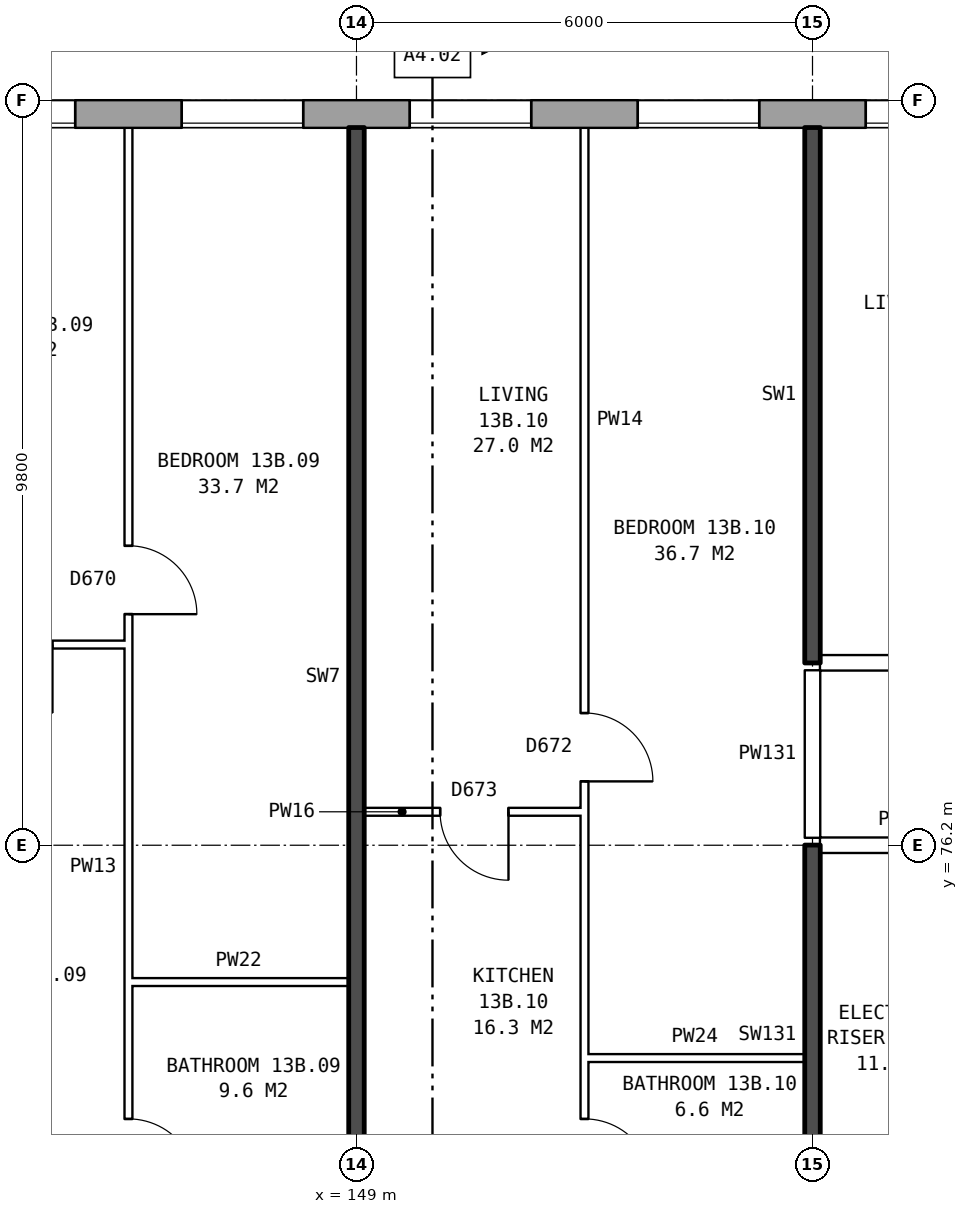
"""IFC4 building model, lengths in metres.
Left out: names, types, materials, properties, quantities, classifications, styles, units other than length and angle.
Written with IfcOpenShell. Run it as: python <this file> out.ifc"""

import sys

from ifc_helpers import new_model, si_unit, direction, frame, frame_2d, origin, place, context, subcontext, project, spatial, rectangle, extrude, element, fill, save


model = new_model("IFC4")
c1 = context("Model", 3, precision=1e-05, world=origin(), true_north=direction((0.0, 1.0)))
c2 = subcontext(c1, "Body", "Model", "MODEL_VIEW")
j1 = project(units=[si_unit("LENGTHUNIT", "METRE"), si_unit("PLANEANGLEUNIT", "RADIAN")], contexts=[c1])
p1 = place(None, origin())
s1 = spatial("IfcSite", under=j1, at=p1, CompositionType="ELEMENT")
p2 = place(p1, origin())
s2 = spatial("IfcBuilding", under=s1, at=p2, CompositionType="ELEMENT")
p3 = place(p2, frame((0.0, 0.0, 50.5)))
s3 = spatial("IfcBuildingStorey", under=s2, at=p3, CompositionType="ELEMENT", Elevation=50.5)
p4 = place(p3, frame((173.425, 85.82, 0.0), z_axis=(0.0, 0.0, 1.0), x_axis=(-1.0, 0.0, 0.0)))
e1 = element("IfcWall", 1, at=p4, inside=s3, PredefinedType="STANDARD", context=c2, shape_type="SweptSolid", body=[
    extrude(rectangle(XDim=39.351, YDim=0.36, at=frame_2d((19.675, 0.0))), origin(), (0.0, 0.0, 1.0), 2.85),
])
p5 = place(p4, frame((1.125, 0.0, 0.8)))
e2 = element("IfcOpeningElement", 2, at=p5, cuts=e1, PredefinedType="OPENING", context=c2, shape_type="SweptSolid", body=[
    extrude(rectangle(XDim=1.6, YDim=1.8, at=frame_2d((0.8, 0.9))), frame((0.0, 0.19, 0.0), z_axis=(0.0, -1.0, 0.0), x_axis=(1.0, 0.0, 0.0)), (0.0, 0.0, 1.0), 0.38),
])
p6 = place(p4, frame((4.125, 0.0, 0.8)))
e3 = element("IfcOpeningElement", 3, at=p6, cuts=e1, PredefinedType="OPENING", context=c2, shape_type="SweptSolid", body=[
    extrude(rectangle(XDim=1.6, YDim=1.8, at=frame_2d((0.8, 0.9))), frame((0.0, 0.19, 0.0), z_axis=(0.0, -1.0, 0.0), x_axis=(1.0, 0.0, 0.0)), (0.0, 0.0, 1.0), 0.38),
])
p7 = place(p4, frame((7.725, 0.0, 0.8)))
e4 = element("IfcOpeningElement", 4, at=p7, cuts=e1, PredefinedType="OPENING", context=c2, shape_type="SweptSolid", body=[
    extrude(rectangle(XDim=0.6, YDim=0.9, at=frame_2d((0.3, 0.45))), frame((0.0, 0.19, 0.0), z_axis=(0.0, -1.0, 0.0), x_axis=(1.0, 0.0, 0.0)), (0.0, 0.0, 1.0), 0.38),
])
p8 = place(p4, frame((10.125, 0.0, 0.8)))
e5 = element("IfcOpeningElement", 5, at=p8, cuts=e1, PredefinedType="OPENING", context=c2, shape_type="SweptSolid", body=[
    extrude(rectangle(XDim=1.6, YDim=1.8, at=frame_2d((0.8, 0.9))), frame((0.0, 0.19, 0.0), z_axis=(0.0, -1.0, 0.0), x_axis=(1.0, 0.0, 0.0)), (0.0, 0.0, 1.0), 0.38),
])
p9 = place(p4, frame((13.125, 0.0, 0.8)))
e6 = element("IfcOpeningElement", 6, at=p9, cuts=e1, PredefinedType="OPENING", context=c2, shape_type="SweptSolid", body=[
    extrude(rectangle(XDim=1.6, YDim=1.8, at=frame_2d((0.8, 0.9))), frame((0.0, 0.19, 0.0), z_axis=(0.0, -1.0, 0.0), x_axis=(1.0, 0.0, 0.0)), (0.0, 0.0, 1.0), 0.38),
])
p10 = place(p4, frame((16.125, 0.0, 0.8)))
e7 = element("IfcOpeningElement", 7, at=p10, cuts=e1, PredefinedType="OPENING", context=c2, shape_type="SweptSolid", body=[
    extrude(rectangle(XDim=1.6, YDim=1.8, at=frame_2d((0.8, 0.9))), frame((0.0, 0.19, 0.0), z_axis=(0.0, -1.0, 0.0), x_axis=(1.0, 0.0, 0.0)), (0.0, 0.0, 1.0), 0.38),
])
p11 = place(p4, frame((19.125, 0.0, 0.8)))
e8 = element("IfcOpeningElement", 8, at=p11, cuts=e1, PredefinedType="OPENING", context=c2, shape_type="SweptSolid", body=[
    extrude(rectangle(XDim=1.6, YDim=1.8, at=frame_2d((0.8, 0.9))), frame((0.0, 0.19, 0.0), z_axis=(0.0, -1.0, 0.0), x_axis=(1.0, 0.0, 0.0)), (0.0, 0.0, 1.0), 0.38),
])
p12 = place(p4, frame((22.125, 0.0, 0.8)))
e9 = element("IfcOpeningElement", 9, at=p12, cuts=e1, PredefinedType="OPENING", context=c2, shape_type="SweptSolid", body=[
    extrude(rectangle(XDim=1.6, YDim=1.8, at=frame_2d((0.8, 0.9))), frame((0.0, 0.19, 0.0), z_axis=(0.0, -1.0, 0.0), x_axis=(1.0, 0.0, 0.0)), (0.0, 0.0, 1.0), 0.38),
])
p13 = place(p4, frame((25.125, 0.0, 0.8)))
e10 = element("IfcOpeningElement", 10, at=p13, cuts=e1, PredefinedType="OPENING", context=c2, shape_type="SweptSolid", body=[
    extrude(rectangle(XDim=1.6, YDim=1.8, at=frame_2d((0.8, 0.9))), frame((0.0, 0.19, 0.0), z_axis=(0.0, -1.0, 0.0), x_axis=(1.0, 0.0, 0.0)), (0.0, 0.0, 1.0), 0.38),
])
p14 = place(p4, frame((28.125, 0.0, 0.8)))
e11 = element("IfcOpeningElement", 11, at=p14, cuts=e1, PredefinedType="OPENING", context=c2, shape_type="SweptSolid", body=[
    extrude(rectangle(XDim=1.6, YDim=1.8, at=frame_2d((0.8, 0.9))), frame((0.0, 0.19, 0.0), z_axis=(0.0, -1.0, 0.0), x_axis=(1.0, 0.0, 0.0)), (0.0, 0.0, 1.0), 0.38),
])
p15 = place(p4, frame((30.625, 0.0, 0.8)))
e12 = element("IfcOpeningElement", 12, at=p15, cuts=e1, PredefinedType="OPENING", context=c2, shape_type="SweptSolid", body=[
    extrude(rectangle(XDim=1.0, YDim=0.9, at=frame_2d((0.5, 0.45))), frame((0.0, 0.19, 0.0), z_axis=(0.0, -1.0, 0.0), x_axis=(1.0, 0.0, 0.0)), (0.0, 0.0, 1.0), 0.38),
])
p16 = place(p4, frame((34.125, 0.0, 0.8)))
e13 = element("IfcOpeningElement", 13, at=p16, cuts=e1, PredefinedType="OPENING", context=c2, shape_type="SweptSolid", body=[
    extrude(rectangle(XDim=1.6, YDim=1.8, at=frame_2d((0.8, 0.9))), frame((0.0, 0.19, 0.0), z_axis=(0.0, -1.0, 0.0), x_axis=(1.0, 0.0, 0.0)), (0.0, 0.0, 1.0), 0.38),
])
p17 = place(p4, frame((37.125, 0.0, 0.8)))
e14 = element("IfcOpeningElement", 14, at=p17, cuts=e1, PredefinedType="OPENING", context=c2, shape_type="SweptSolid", body=[
    extrude(rectangle(XDim=1.6, YDim=1.8, at=frame_2d((0.8, 0.9))), frame((0.0, 0.19, 0.0), z_axis=(0.0, -1.0, 0.0), x_axis=(1.0, 0.0, 0.0)), (0.0, 0.0, 1.0), 0.38),
])
p18 = place(p4, frame((8.625, 0.0, 0.8)))
e15 = element("IfcOpeningElement", 15, at=p18, cuts=e1, PredefinedType="OPENING", context=c2, shape_type="SweptSolid", body=[
    extrude(rectangle(XDim=0.6, YDim=1.5, at=frame_2d((0.3, 0.75))), frame((0.0, 0.19, 0.0), z_axis=(0.0, -1.0, 0.0), x_axis=(1.0, 0.0, 0.0)), (0.0, 0.0, 1.0), 0.38),
])
p19 = place(p4, frame((32.875, 0.0, 1.7)))
e16 = element("IfcOpeningElement", 16, at=p19, cuts=e1, PredefinedType="OPENING", context=c2, shape_type="SweptSolid", body=[
    extrude(rectangle(XDim=0.8, YDim=0.9, at=frame_2d((0.4, 0.45))), frame((0.0, 0.19, 0.0), z_axis=(0.0, -1.0, 0.0), x_axis=(1.0, 0.0, 0.0)), (0.0, 0.0, 1.0), 0.38),
])
for number, where, z_axis, x_axis in (
    (17, (152.0, 73.4, 0.0), (0.0, 0.0, 1.0), (1.0, 0.0, 0.0)),
    (18, (146.0, 74.4, 0.0), (0.0, 0.0, 1.0), (1.0, 0.0, 0.0)),
):
    element("IfcWall", number, at=place(p3, frame(where, z_axis=z_axis, x_axis=x_axis)), inside=s3, PredefinedType="PARTITIONING", context=c2, shape_type="SweptSolid", body=[
        extrude(rectangle(XDim=2.9, YDim=0.1, at=frame_2d((1.45, 0.0))), origin(), (0.0, 0.0, 1.0), 2.85),
    ])
p20 = place(p3, frame((155.1, 76.2, 0.0), z_axis=(0.0, 0.0, 1.0), x_axis=(1.0, 0.0, 0.0)))
e19 = element("IfcWall", 19, at=p20, inside=s3, PredefinedType="PARTITIONING", context=c2, shape_type="SweptSolid", body=[
    extrude(rectangle(XDim=2.14, YDim=0.2, at=frame_2d((1.07, 0.0))), origin(), (0.0, 0.0, 1.0), 2.85),
])
p21 = place(p3, frame((149.1, 76.64, 0.0), z_axis=(0.0, 0.0, 1.0), x_axis=(1.0, 0.0, 0.0)))
e20 = element("IfcWall", 20, at=p21, inside=s3, PredefinedType="PARTITIONING", context=c2, shape_type="SweptSolid", body=[
    extrude(rectangle(XDim=2.9, YDim=0.1, at=frame_2d((1.45, 0.0))), origin(), (0.0, 0.0, 1.0), 2.85),
])
p22 = place(p21, frame((1.0, 0.0, 0.0)))
e21 = element("IfcOpeningElement", 21, at=p22, cuts=e20, PredefinedType="OPENING", context=c2, shape_type="SweptSolid", body=[
    extrude(rectangle(XDim=0.9, YDim=2.1, at=frame_2d((0.45, 1.05))), frame((0.0, 0.06, 0.0), z_axis=(0.0, -1.0, 0.0), x_axis=(1.0, 0.0, 0.0)), (0.0, 0.0, 1.0), 0.12),
])
p23 = place(p3, frame((155.1, 78.6, 0.0), z_axis=(0.0, 0.0, 1.0), x_axis=(1.0, 0.0, 0.0)))
e22 = element("IfcWall", 22, at=p23, inside=s3, PredefinedType="PARTITIONING", context=c2, shape_type="SweptSolid", body=[
    extrude(rectangle(XDim=21.04, YDim=0.2, at=frame_2d((10.52, 0.0))), origin(), (0.0, 0.0, 1.0), 2.85),
])
p24 = place(p23, frame((2.45, 0.0, 0.0)))
e23 = element("IfcOpeningElement", 23, at=p24, cuts=e22, PredefinedType="OPENING", context=c2, shape_type="SweptSolid", body=[
    extrude(rectangle(XDim=1.0, YDim=2.1, at=frame_2d((0.5, 1.05))), frame((0.0, 0.11, 0.0), z_axis=(0.0, -1.0, 0.0), x_axis=(1.0, 0.0, 0.0)), (0.0, 0.0, 1.0), 0.22),
])
p25 = place(p23, frame((14.4, 0.0, 0.0)))
e24 = element("IfcOpeningElement", 24, at=p25, cuts=e22, PredefinedType="OPENING", context=c2, shape_type="SweptSolid", body=[
    extrude(rectangle(XDim=1.0, YDim=2.1, at=frame_2d((0.5, 1.05))), frame((0.0, 0.11, 0.0), z_axis=(0.0, -1.0, 0.0), x_axis=(1.0, 0.0, 0.0)), (0.0, 0.0, 1.0), 0.22),
])
p26 = place(p3, frame((143.1, 78.84, 0.0), z_axis=(0.0, 0.0, 1.0), x_axis=(1.0, 0.0, 0.0)))
e25 = element("IfcWall", 25, at=p26, inside=s3, PredefinedType="PARTITIONING", context=c2, shape_type="SweptSolid", body=[
    extrude(rectangle(XDim=2.9, YDim=0.1, at=frame_2d((1.45, 0.0))), origin(), (0.0, 0.0, 1.0), 2.85),
])
p27 = place(p26, frame((1.0, 0.0, 0.0)))
e26 = element("IfcOpeningElement", 26, at=p27, cuts=e25, PredefinedType="OPENING", context=c2, shape_type="SweptSolid", body=[
    extrude(rectangle(XDim=0.9, YDim=2.1, at=frame_2d((0.45, 1.05))), frame((0.0, 0.06, 0.0), z_axis=(0.0, -1.0, 0.0), x_axis=(1.0, 0.0, 0.0)), (0.0, 0.0, 1.0), 0.12),
])
p28 = place(p3, frame((146.0, 71.3, 0.0), z_axis=(0.0, 0.0, 1.0), x_axis=(0.0, 1.0, 0.0)))
e27 = element("IfcWall", 27, at=p28, inside=s3, PredefinedType="PARTITIONING", context=c2, shape_type="SweptSolid", body=[
    extrude(rectangle(XDim=14.34, YDim=0.1, at=frame_2d((7.17, 0.0))), origin(), (0.0, 0.0, 1.0), 2.85),
])
p29 = place(p28, frame((7.94, 0.0, 0.0)))
e28 = element("IfcOpeningElement", 28, at=p29, cuts=e27, PredefinedType="OPENING", context=c2, shape_type="SweptSolid", body=[
    extrude(rectangle(XDim=0.9, YDim=2.1, at=frame_2d((0.45, 1.05))), frame((0.0, 0.06, 0.0), z_axis=(0.0, -1.0, 0.0), x_axis=(1.0, 0.0, 0.0)), (0.0, 0.0, 1.0), 0.12),
])
p30 = place(p28, frame((0.4, 0.0, 0.0)))
e29 = element("IfcOpeningElement", 29, at=p30, cuts=e27, PredefinedType="OPENING", context=c2, shape_type="SweptSolid", body=[
    extrude(rectangle(XDim=0.9, YDim=2.1, at=frame_2d((0.45, 1.05))), frame((0.0, 0.06, 0.0), z_axis=(0.0, -1.0, 0.0), x_axis=(1.0, 0.0, 0.0)), (0.0, 0.0, 1.0), 0.12),
])
p31 = place(p3, frame((149.0, 71.2, 0.0), z_axis=(0.0, 0.0, 1.0), x_axis=(0.0, 1.0, 0.0)))
e30 = element("IfcWall", 30, at=p31, inside=s3, PredefinedType="SOLIDWALL", context=c2, shape_type="SweptSolid", body=[
    extrude(rectangle(XDim=14.44, YDim=0.2, at=frame_2d((7.22, 0.0))), origin(), (0.0, 0.0, 1.0), 2.85),
])
p32 = place(p3, frame((152.0, 71.3, 0.0), z_axis=(0.0, 0.0, 1.0), x_axis=(0.0, 1.0, 0.0)))
e31 = element("IfcWall", 31, at=p32, inside=s3, PredefinedType="PARTITIONING", context=c2, shape_type="SweptSolid", body=[
    extrude(rectangle(XDim=14.34, YDim=0.1, at=frame_2d((7.17, 0.0))), origin(), (0.0, 0.0, 1.0), 2.85),
])
p33 = place(p32, frame((5.74, 0.0, 0.0)))
e32 = element("IfcOpeningElement", 32, at=p33, cuts=e31, PredefinedType="OPENING", context=c2, shape_type="SweptSolid", body=[
    extrude(rectangle(XDim=0.9, YDim=2.1, at=frame_2d((0.45, 1.05))), frame((0.0, 0.06, 0.0), z_axis=(0.0, -1.0, 0.0), x_axis=(1.0, 0.0, 0.0)), (0.0, 0.0, 1.0), 0.12),
])
p34 = place(p32, frame((0.4, 0.0, 0.0)))
e33 = element("IfcOpeningElement", 33, at=p34, cuts=e31, PredefinedType="OPENING", context=c2, shape_type="SweptSolid", body=[
    extrude(rectangle(XDim=0.9, YDim=2.1, at=frame_2d((0.45, 1.05))), frame((0.0, 0.06, 0.0), z_axis=(0.0, -1.0, 0.0), x_axis=(1.0, 0.0, 0.0)), (0.0, 0.0, 1.0), 0.12),
])
p35 = place(p3, frame((155.0, 71.2, 0.0), z_axis=(0.0, 0.0, 1.0), x_axis=(0.0, 1.0, 0.0)))
e34 = element("IfcWall", 34, at=p35, inside=s3, PredefinedType="SOLIDWALL", context=c2, shape_type="SweptSolid", body=[
    extrude(rectangle(XDim=5.0, YDim=0.2, at=frame_2d((2.5, 0.0))), origin(), (0.0, 0.0, 1.0), 2.85),
])
p36 = place(p3, frame((155.0, 76.3, 0.0), z_axis=(0.0, 0.0, 1.0), x_axis=(0.0, 1.0, 0.0)))
e35 = element("IfcWall", 35, at=p36, inside=s3, PredefinedType="PARTITIONING", context=c2, shape_type="SweptSolid", body=[
    extrude(rectangle(XDim=2.2, YDim=0.2, at=frame_2d((1.1, 0.0))), origin(), (0.0, 0.0, 1.0), 2.85),
])
p37 = place(p3, frame((155.0, 78.6, 0.0), z_axis=(0.0, 0.0, 1.0), x_axis=(0.0, 1.0, 0.0)))
e36 = element("IfcWall", 36, at=p37, inside=s3, PredefinedType="SOLIDWALL", context=c2, shape_type="SweptSolid", body=[
    extrude(rectangle(XDim=7.04, YDim=0.2, at=frame_2d((3.52, 0.0))), origin(), (0.0, 0.0, 1.0), 2.85),
])
p38 = place(p10, origin())
e37 = element("IfcWindow", 37, at=p38, inside=s3, PartitioningType="SINGLE_PANEL", PredefinedType="WINDOW", context=c2, shape_type="SweptSolid", body=[
    extrude(rectangle(XDim=1.6, YDim=1.8, at=frame_2d((0.8, 0.9))), frame((0.0, 0.15, 0.0), z_axis=(0.0, -1.0, 0.0), x_axis=(1.0, 0.0, 0.0)), (0.0, 0.0, 1.0), 0.06),
])
fill(e7, e37)
p39 = place(p11, origin())
e38 = element("IfcWindow", 38, at=p39, inside=s3, PartitioningType="SINGLE_PANEL", PredefinedType="WINDOW", context=c2, shape_type="SweptSolid", body=[
    extrude(rectangle(XDim=1.6, YDim=1.8, at=frame_2d((0.8, 0.9))), frame((0.0, 0.15, 0.0), z_axis=(0.0, -1.0, 0.0), x_axis=(1.0, 0.0, 0.0)), (0.0, 0.0, 1.0), 0.06),
])
fill(e8, e38)
p40 = place(p12, origin())
e39 = element("IfcWindow", 39, at=p40, inside=s3, PartitioningType="SINGLE_PANEL", PredefinedType="WINDOW", context=c2, shape_type="SweptSolid", body=[
    extrude(rectangle(XDim=1.6, YDim=1.8, at=frame_2d((0.8, 0.9))), frame((0.0, 0.15, 0.0), z_axis=(0.0, -1.0, 0.0), x_axis=(1.0, 0.0, 0.0)), (0.0, 0.0, 1.0), 0.06),
])
fill(e9, e39)
p41 = place(p13, origin())
e40 = element("IfcWindow", 40, at=p41, inside=s3, PartitioningType="SINGLE_PANEL", PredefinedType="WINDOW", context=c2, shape_type="SweptSolid", body=[
    extrude(rectangle(XDim=1.6, YDim=1.8, at=frame_2d((0.8, 0.9))), frame((0.0, 0.15, 0.0), z_axis=(0.0, -1.0, 0.0), x_axis=(1.0, 0.0, 0.0)), (0.0, 0.0, 1.0), 0.06),
])
fill(e10, e40)
p42 = place(p14, origin())
e41 = element("IfcWindow", 41, at=p42, inside=s3, PartitioningType="SINGLE_PANEL", PredefinedType="WINDOW", context=c2, shape_type="SweptSolid", body=[
    extrude(rectangle(XDim=1.6, YDim=1.8, at=frame_2d((0.8, 0.9))), frame((0.0, 0.15, 0.0), z_axis=(0.0, -1.0, 0.0), x_axis=(1.0, 0.0, 0.0)), (0.0, 0.0, 1.0), 0.06),
])
fill(e11, e41)
p43 = place(p29, frame((0.9, 0.0, 0.0), z_axis=(0.0, 0.0, 1.0), x_axis=(-1.0, 0.0, 0.0)))
e42 = element("IfcDoor", 42, at=p43, inside=s3, OperationType="SINGLE_SWING_RIGHT", PredefinedType="DOOR", context=c2, shape_type="SweptSolid", body=[
    extrude(rectangle(XDim=0.9, YDim=2.1, at=frame_2d((0.45, 1.05))), frame((0.0, 0.025, 0.0), z_axis=(0.0, -1.0, 0.0), x_axis=(1.0, 0.0, 0.0)), (0.0, 0.0, 1.0), 0.05),
])
fill(e28, e42)
p44 = place(p30, frame((0.9, 0.0, 0.0), z_axis=(0.0, 0.0, 1.0), x_axis=(-1.0, 0.0, 0.0)))
e43 = element("IfcDoor", 43, at=p44, inside=s3, OperationType="SINGLE_SWING_RIGHT", PredefinedType="DOOR", context=c2, shape_type="SweptSolid", body=[
    extrude(rectangle(XDim=0.9, YDim=2.1, at=frame_2d((0.45, 1.05))), frame((0.0, 0.025, 0.0), z_axis=(0.0, -1.0, 0.0), x_axis=(1.0, 0.0, 0.0)), (0.0, 0.0, 1.0), 0.05),
])
fill(e29, e43)
p45 = place(p33, frame((0.9, 0.0, 0.0), z_axis=(0.0, 0.0, 1.0), x_axis=(-1.0, 0.0, 0.0)))
e44 = element("IfcDoor", 44, at=p45, inside=s3, OperationType="SINGLE_SWING_RIGHT", PredefinedType="DOOR", context=c2, shape_type="SweptSolid", body=[
    extrude(rectangle(XDim=0.9, YDim=2.1, at=frame_2d((0.45, 1.05))), frame((0.0, 0.025, 0.0), z_axis=(0.0, -1.0, 0.0), x_axis=(1.0, 0.0, 0.0)), (0.0, 0.0, 1.0), 0.05),
])
fill(e32, e44)
p46 = place(p22, frame((0.9, 0.0, 0.0), z_axis=(0.0, 0.0, 1.0), x_axis=(-1.0, 0.0, 0.0)))
e45 = element("IfcDoor", 45, at=p46, inside=s3, OperationType="SINGLE_SWING_LEFT", PredefinedType="DOOR", context=c2, shape_type="SweptSolid", body=[
    extrude(rectangle(XDim=0.9, YDim=2.1, at=frame_2d((0.45, 1.05))), frame((0.0, 0.025, 0.0), z_axis=(0.0, -1.0, 0.0), x_axis=(1.0, 0.0, 0.0)), (0.0, 0.0, 1.0), 0.05),
])
fill(e21, e45)
p47 = place(p34, frame((0.9, 0.0, 0.0), z_axis=(0.0, 0.0, 1.0), x_axis=(-1.0, 0.0, 0.0)))
e46 = element("IfcDoor", 46, at=p47, inside=s3, OperationType="SINGLE_SWING_RIGHT", PredefinedType="DOOR", context=c2, shape_type="SweptSolid", body=[
    extrude(rectangle(XDim=0.9, YDim=2.1, at=frame_2d((0.45, 1.05))), frame((0.0, 0.025, 0.0), z_axis=(0.0, -1.0, 0.0), x_axis=(1.0, 0.0, 0.0)), (0.0, 0.0, 1.0), 0.05),
])
fill(e33, e46)
save(model, sys.argv[1])
